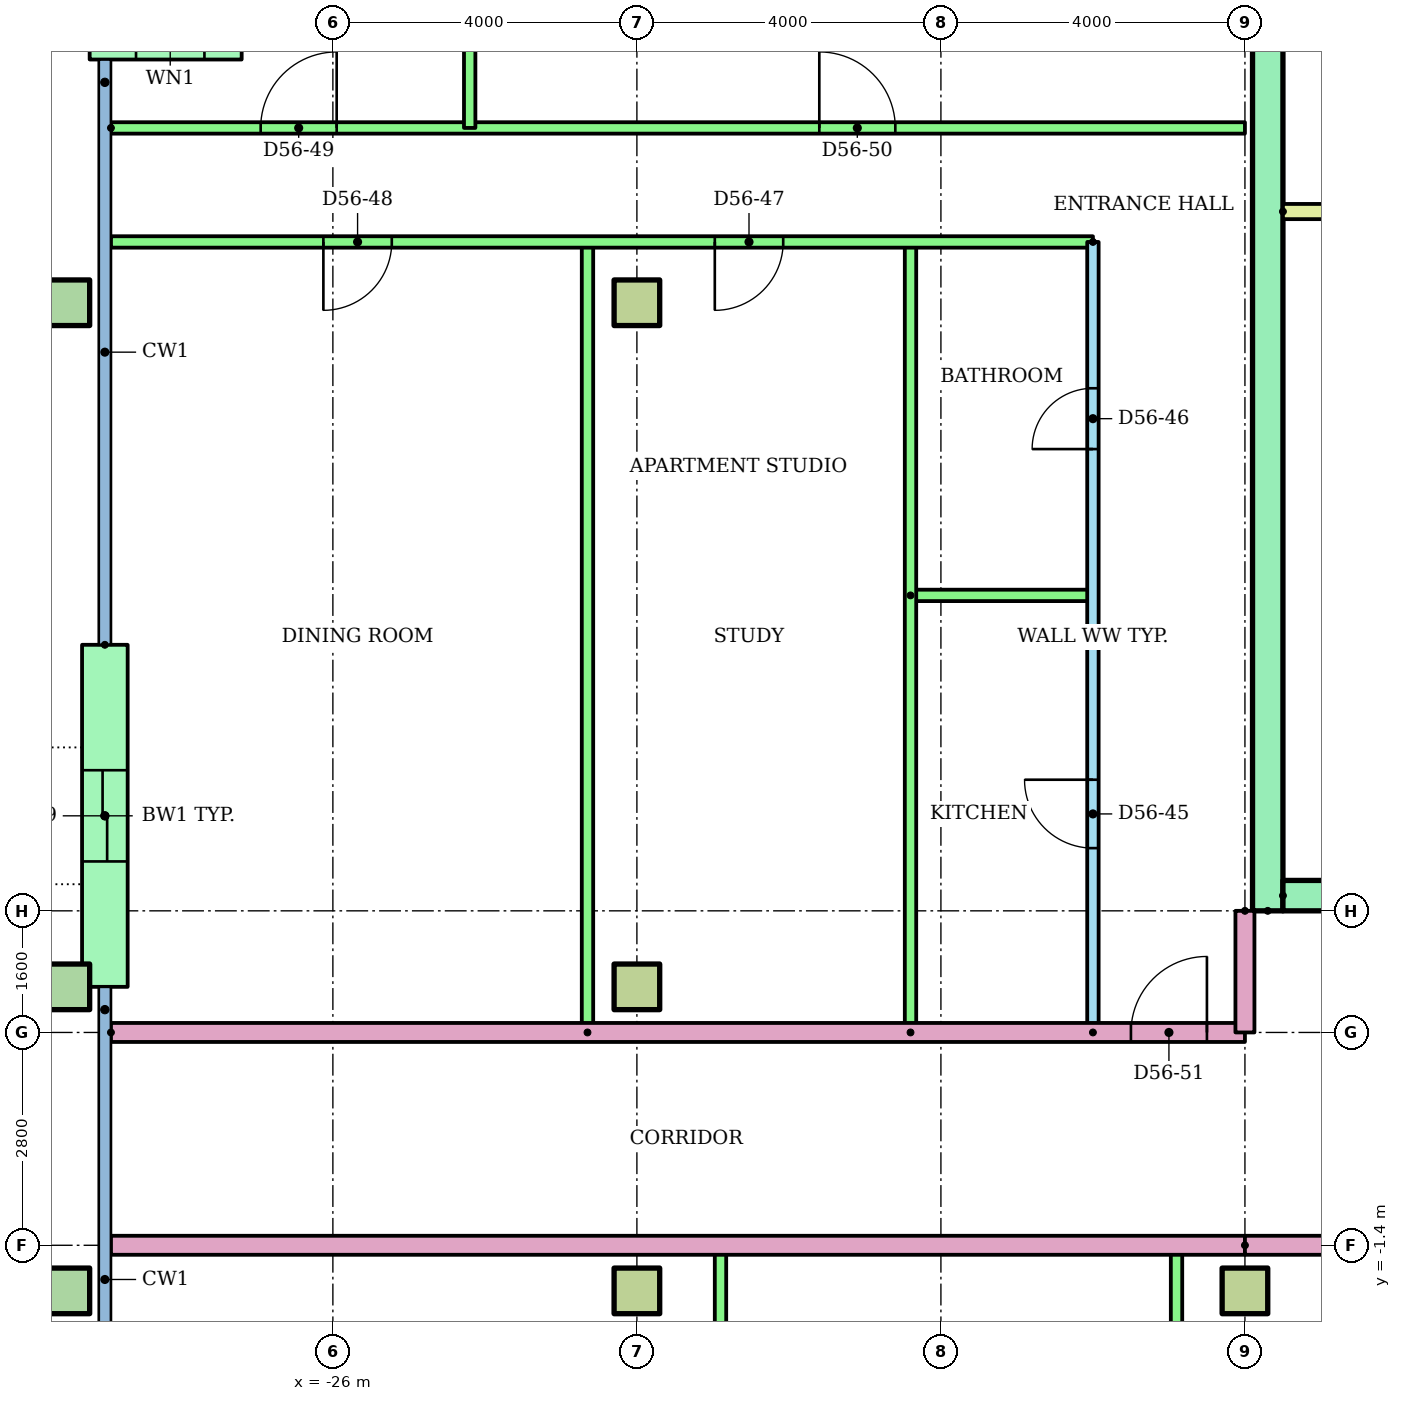
"""IFC4 building model, lengths in metres.
Left out: names, types, materials, properties, quantities, classifications, styles, units other than length and angle.
Written with IfcOpenShell. Run it as: python <this file> out.ifc"""

import sys

from ifc_helpers import new_model, si_unit, direction, frame, frame_2d, origin, origin_2d, place, context, subcontext, project, spatial, rectangle, hollow_rectangle, extrude, element, fill, save


model = new_model("IFC4")
c1 = context("Model", 3, precision=1e-05, world=origin(), true_north=direction((0.0, 1.0)))
c2 = subcontext(c1, "Body", "Model", "MODEL_VIEW")
j1 = project(units=[si_unit("LENGTHUNIT", "METRE"), si_unit("PLANEANGLEUNIT", "RADIAN")], contexts=[c1])
p1 = place(None, origin())
s1 = spatial("IfcSite", under=j1, at=p1, CompositionType="ELEMENT")
p2 = place(p1, origin())
s2 = spatial("IfcBuilding", under=s1, at=p2, CompositionType="ELEMENT")
p3 = place(p2, frame((0.0, 0.0, 217.2)))
s3 = spatial("IfcBuildingStorey", under=s2, at=p3, CompositionType="ELEMENT", Elevation=217.2)
p4 = place(p3, frame((-29.5, -2.0, 0.0)))
e1 = element("IfcColumn", 1, at=p4, inside=s3, PredefinedType="COLUMN", context=c2, shape_type="SweptSolid", body=[
    extrude(hollow_rectangle(XDim=0.6, YDim=0.6, WallThickness=0.03, at=origin_2d()), origin(), (0.0, 0.0, 1.0), 3.2),
])
for number, where in (
    (2, (-22.0, -2.0, 0.0)),
    (3, (-14.0, -2.0, 0.0)),
):
    element("IfcColumn", number, at=place(p3, frame(where)), inside=s3, PredefinedType="COLUMN", context=c2, shape_type="SweptSolid", body=[
        extrude(rectangle(XDim=0.6, YDim=0.6, at=origin_2d()), origin(), (0.0, 0.0, 1.0), 3.2),
    ])
p5 = place(p3, frame((-29.5, 2.0, 0.0)))
e4 = element("IfcColumn", 4, at=p5, inside=s3, PredefinedType="COLUMN", context=c2, shape_type="SweptSolid", body=[
    extrude(hollow_rectangle(XDim=0.6, YDim=0.6, WallThickness=0.03, at=origin_2d()), origin(), (0.0, 0.0, 1.0), 3.2),
])
p6 = place(p3, frame((-22.0, 2.0, 0.0)))
e5 = element("IfcColumn", 5, at=p6, inside=s3, PredefinedType="COLUMN", context=c2, shape_type="SweptSolid", body=[
    extrude(rectangle(XDim=0.6, YDim=0.6, at=origin_2d()), origin(), (0.0, 0.0, 1.0), 3.2),
])
p7 = place(p3, frame((-29.5, 11.0, 0.0)))
e6 = element("IfcColumn", 6, at=p7, inside=s3, PredefinedType="COLUMN", context=c2, shape_type="SweptSolid", body=[
    extrude(hollow_rectangle(XDim=0.6, YDim=0.6, WallThickness=0.03, at=origin_2d()), origin(), (0.0, 0.0, 1.0), 3.2),
])
p8 = place(p3, frame((-22.0, 11.0, 0.0)))
e7 = element("IfcColumn", 7, at=p8, inside=s3, PredefinedType="COLUMN", context=c2, shape_type="SweptSolid", body=[
    extrude(rectangle(XDim=0.6, YDim=0.6, at=origin_2d()), origin(), (0.0, 0.0, 1.0), 3.2),
])
p9 = place(p3, frame((-27.2, 14.5, 0.0), z_axis=(0.0, 0.0, 1.0), x_axis=(-1.0, 0.0, 0.0)))
e8 = element("IfcWall", 8, at=p9, inside=s3, PredefinedType="STANDARD", context=c2, shape_type="SweptSolid", body=[
    extrude(rectangle(XDim=2.0, YDim=0.6, at=frame_2d((1.0, 0.0))), origin(), (0.0, 0.0, 1.0), 2.92),
])
p10 = place(p9, frame((0.49, 0.0, 0.9)))
e9 = element("IfcOpeningElement", 9, at=p10, cuts=e8, PredefinedType="OPENING", context=c2, shape_type="SweptSolid", body=[
    extrude(rectangle(XDim=0.9, YDim=1.5, at=frame_2d((0.45, 0.75))), frame((0.0, 0.31, 0.0), z_axis=(0.0, -1.0, 0.0), x_axis=(1.0, 0.0, 0.0)), (0.0, 0.0, 1.0), 0.62),
])
p11 = place(p3, frame((-29.0, 6.5, 0.0), z_axis=(0.0, 0.0, 1.0), x_axis=(0.0, -1.0, 0.0)))
e10 = element("IfcWall", 10, at=p11, inside=s3, PredefinedType="STANDARD", context=c2, shape_type="SweptSolid", body=[
    extrude(rectangle(XDim=4.5, YDim=0.6, at=frame_2d((2.25, 0.0))), origin(), (0.0, 0.0, 1.0), 2.92),
])
p12 = place(p11, frame((1.65, 0.0, 0.0)))
e11 = element("IfcOpeningElement", 11, at=p12, cuts=e10, PredefinedType="OPENING", context=c2, shape_type="SweptSolid", body=[
    extrude(rectangle(XDim=1.2, YDim=2.1, at=frame_2d((0.6, 1.05))), frame((0.0, 0.31, 0.0), z_axis=(0.0, -1.0, 0.0), x_axis=(1.0, 0.0, 0.0)), (0.0, 0.0, 1.0), 0.62),
])
p13 = place(p3, frame((-13.7, 3.0, 0.0), z_axis=(0.0, 0.0, 1.0), x_axis=(0.0, 1.0, 0.0)))
e12 = element("IfcWall", 12, at=p13, inside=s3, PredefinedType="SHEAR", context=c2, shape_type="SweptSolid", body=[
    extrude(rectangle(XDim=17.0, YDim=0.4, at=frame_2d((8.5, 0.0))), origin(), (0.0, 0.0, 1.0), 2.92),
])
p14 = place(p3, frame((-13.5, 3.2, 0.0)))
e13 = element("IfcWall", 13, at=p14, inside=s3, PredefinedType="SHEAR", context=c2, shape_type="SweptSolid", body=[
    extrude(rectangle(XDim=27.0, YDim=0.4, at=frame_2d((13.5, 0.0))), origin(), (0.0, 0.0, 1.0), 2.92),
])
p15 = place(p14, frame((22.083, 0.0, 0.0)))
e14 = element("IfcOpeningElement", 14, at=p15, cuts=e13, PredefinedType="OPENING", context=c2, shape_type="SweptSolid", body=[
    extrude(rectangle(XDim=1.1, YDim=2.1, at=frame_2d((0.55, 1.05))), frame((0.0, 0.21, 0.0), z_axis=(0.0, -1.0, 0.0), x_axis=(1.0, 0.0, 0.0)), (0.0, 0.0, 1.0), 0.42),
])
p16 = place(p14, frame((25.128, 0.0, 0.0)))
e15 = element("IfcOpeningElement", 15, at=p16, cuts=e13, PredefinedType="OPENING", context=c2, shape_type="SweptSolid", body=[
    extrude(rectangle(XDim=1.1, YDim=2.1, at=frame_2d((0.55, 1.05))), frame((0.0, 0.21, 0.0), z_axis=(0.0, -1.0, 0.0), x_axis=(1.0, 0.0, 0.0)), (0.0, 0.0, 1.0), 0.42),
])
p17 = place(p14, frame((12.6, 0.0, 0.0)))
e16 = element("IfcOpeningElement", 16, at=p17, cuts=e13, PredefinedType="OPENING", context=c2, shape_type="SweptSolid", body=[
    extrude(rectangle(XDim=1.8, YDim=2.1, at=frame_2d((0.9, 1.05))), frame((0.0, 0.21, 0.0), z_axis=(0.0, -1.0, 0.0), x_axis=(1.0, 0.0, 0.0)), (0.0, 0.0, 1.0), 0.42),
])
p18 = place(p3, frame((-13.5, 12.2, 0.0)))
e17 = element("IfcWall", 17, at=p18, inside=s3, PredefinedType="PARTITIONING", context=c2, shape_type="SweptSolid", body=[
    extrude(rectangle(XDim=3.9, YDim=0.2, at=frame_2d((1.95, 0.0))), origin(), (0.0, 0.0, 1.0), 2.92),
])
for number, where, z_axis, x_axis in (
    (18, (-14.9, -9.4, 0.0), (0.0, 0.0, 1.0), (0.0, 1.0, 0.0)),
    (19, (-20.9, -9.4, 0.0), (0.0, 0.0, 1.0), (0.0, 1.0, 0.0)),
):
    element("IfcWall", number, at=place(p3, frame(where, z_axis=z_axis, x_axis=x_axis)), inside=s3, PredefinedType="PARTITIONING", context=c2, shape_type="SweptSolid", body=[
        extrude(rectangle(XDim=8.0, YDim=0.15, at=frame_2d((4.0, 0.0))), origin(), (0.0, 0.0, 1.0), 2.4),
    ])
p19 = place(p3, frame((-14.0, -1.4, 0.0), z_axis=(0.0, 0.0, 1.0), x_axis=(-1.0, 0.0, 0.0)))
e20 = element("IfcWall", 20, at=p19, inside=s3, PredefinedType="PARTITIONING", context=c2, shape_type="SweptSolid", body=[
    extrude(rectangle(XDim=14.92, YDim=0.25, at=frame_2d((7.46, 0.0))), origin(), (0.0, 0.0, 1.0), 2.4),
])
p20 = place(p3, frame((-16.0, 1.4, 0.0), z_axis=(0.0, 0.0, 1.0), x_axis=(0.0, 1.0, 0.0)))
e21 = element("IfcWall", 21, at=p20, inside=s3, PredefinedType="PARTITIONING", context=c2, shape_type="SweptSolid", body=[
    extrude(rectangle(XDim=10.4, YDim=0.15, at=frame_2d((5.2, 0.0))), origin(), (0.0, 0.0, 1.0), 2.4),
])
p21 = place(p20, frame((2.425, 0.0, 0.0)))
e22 = element("IfcOpeningElement", 22, at=p21, cuts=e21, PredefinedType="OPENING", context=c2, shape_type="SweptSolid", body=[
    extrude(rectangle(XDim=0.9, YDim=2.1, at=frame_2d((0.45, 1.05))), frame((0.0, 0.085, 0.0), z_axis=(0.0, -1.0, 0.0), x_axis=(1.0, 0.0, 0.0)), (0.0, 0.0, 1.0), 0.17),
])
p22 = place(p20, frame((7.675, 0.0, 0.0)))
e23 = element("IfcOpeningElement", 23, at=p22, cuts=e21, PredefinedType="OPENING", context=c2, shape_type="SweptSolid", body=[
    extrude(rectangle(XDim=0.8, YDim=2.1, at=frame_2d((0.4, 1.05))), frame((0.0, 0.085, 0.0), z_axis=(0.0, -1.0, 0.0), x_axis=(1.0, 0.0, 0.0)), (0.0, 0.0, 1.0), 0.17),
])
p23 = place(p3, frame((-18.4, 7.15, 0.0)))
e24 = element("IfcWall", 24, at=p23, inside=s3, PredefinedType="PARTITIONING", context=c2, shape_type="SweptSolid", body=[
    extrude(rectangle(XDim=2.4, YDim=0.15, at=frame_2d((1.2, 0.0))), origin(), (0.0, 0.0, 1.0), 2.4),
])
for number, where, z_axis, x_axis in (
    (25, (-18.4, 1.4, 0.0), (0.0, 0.0, 1.0), (0.0, 1.0, 0.0)),
    (26, (-22.65, 1.4, 0.0), (0.0, 0.0, 1.0), (0.0, 1.0, 0.0)),
):
    element("IfcWall", number, at=place(p3, frame(where, z_axis=z_axis, x_axis=x_axis)), inside=s3, PredefinedType="PARTITIONING", context=c2, shape_type="SweptSolid", body=[
        extrude(rectangle(XDim=10.4, YDim=0.15, at=frame_2d((5.2, 0.0))), origin(), (0.0, 0.0, 1.0), 2.4),
    ])
p24 = place(p3, frame((-16.0, 11.8, 0.0), z_axis=(0.0, 0.0, 1.0), x_axis=(-1.0, 0.0, 0.0)))
e27 = element("IfcWall", 27, at=p24, inside=s3, PredefinedType="PARTITIONING", context=c2, shape_type="SweptSolid", body=[
    extrude(rectangle(XDim=12.92, YDim=0.15, at=frame_2d((6.46, 0.0))), origin(), (0.0, 0.0, 1.0), 2.4),
])
p25 = place(p24, frame((4.075, 0.0, 0.0)))
e28 = element("IfcOpeningElement", 28, at=p25, cuts=e27, PredefinedType="OPENING", context=c2, shape_type="SweptSolid", body=[
    extrude(rectangle(XDim=0.9, YDim=2.1, at=frame_2d((0.45, 1.05))), frame((0.0, 0.085, 0.0), z_axis=(0.0, -1.0, 0.0), x_axis=(1.0, 0.0, 0.0)), (0.0, 0.0, 1.0), 0.17),
])
p26 = place(p24, frame((9.225, 0.0, 0.0)))
e29 = element("IfcOpeningElement", 29, at=p26, cuts=e27, PredefinedType="OPENING", context=c2, shape_type="SweptSolid", body=[
    extrude(rectangle(XDim=0.9, YDim=2.1, at=frame_2d((0.45, 1.05))), frame((0.0, 0.085, 0.0), z_axis=(0.0, -1.0, 0.0), x_axis=(1.0, 0.0, 0.0)), (0.0, 0.0, 1.0), 0.17),
])
p27 = place(p3, frame((-28.92, 13.3, 0.0)))
e30 = element("IfcWall", 30, at=p27, inside=s3, PredefinedType="PARTITIONING", context=c2, shape_type="SweptSolid", body=[
    extrude(rectangle(XDim=14.92, YDim=0.15, at=frame_2d((7.46, 0.0))), origin(), (0.0, 0.0, 1.0), 2.4),
])
p28 = place(p27, frame((1.97, 0.0, 0.0)))
e31 = element("IfcOpeningElement", 31, at=p28, cuts=e30, PredefinedType="OPENING", context=c2, shape_type="SweptSolid", body=[
    extrude(rectangle(XDim=1.0, YDim=2.1, at=frame_2d((0.5, 1.05))), frame((0.0, 0.085, 0.0), z_axis=(0.0, -1.0, 0.0), x_axis=(1.0, 0.0, 0.0)), (0.0, 0.0, 1.0), 0.17),
])
p29 = place(p27, frame((9.32, 0.0, 0.0)))
e32 = element("IfcOpeningElement", 32, at=p29, cuts=e30, PredefinedType="OPENING", context=c2, shape_type="SweptSolid", body=[
    extrude(rectangle(XDim=1.0, YDim=2.1, at=frame_2d((0.5, 1.05))), frame((0.0, 0.085, 0.0), z_axis=(0.0, -1.0, 0.0), x_axis=(1.0, 0.0, 0.0)), (0.0, 0.0, 1.0), 0.17),
])
p30 = place(p3, frame((-24.2, 17.12, 0.0), z_axis=(0.0, 0.0, 1.0), x_axis=(0.0, -1.0, 0.0)))
e33 = element("IfcWall", 33, at=p30, inside=s3, PredefinedType="PARTITIONING", context=c2, shape_type="SweptSolid", body=[
    extrude(rectangle(XDim=3.82, YDim=0.15, at=frame_2d((1.91, 0.0))), origin(), (0.0, 0.0, 1.0), 2.4),
])
p31 = place(p3, frame((-28.92, 1.4, 0.0)))
e34 = element("IfcWall", 34, at=p31, inside=s3, PredefinedType="PARTITIONING", context=c2, shape_type="SweptSolid", body=[
    extrude(rectangle(XDim=14.92, YDim=0.25, at=frame_2d((7.46, 0.0))), origin(), (0.0, 0.0, 1.0), 2.4),
])
p32 = place(p31, frame((13.42, 0.0, 0.0)))
e35 = element("IfcOpeningElement", 35, at=p32, cuts=e34, PredefinedType="OPENING", context=c2, shape_type="SweptSolid", body=[
    extrude(rectangle(XDim=1.0, YDim=2.1, at=frame_2d((0.5, 1.05))), frame((0.0, 0.135, 0.0), z_axis=(0.0, -1.0, 0.0), x_axis=(1.0, 0.0, 0.0)), (0.0, 0.0, 1.0), 0.27),
])
p33 = place(p3, frame((14.0, -1.4, 0.0), z_axis=(0.0, 0.0, 1.0), x_axis=(-1.0, 0.0, 0.0)))
e36 = element("IfcWall", 36, at=p33, inside=s3, PredefinedType="PARTITIONING", context=c2, shape_type="SweptSolid", body=[
    extrude(rectangle(XDim=28.0, YDim=0.25, at=frame_2d((14.0, 0.0))), origin(), (0.0, 0.0, 1.0), 2.4),
])
p34 = place(p33, frame((20.5, 0.0, 0.0)))
e37 = element("IfcOpeningElement", 37, at=p34, cuts=e36, PredefinedType="OPENING", context=c2, shape_type="SweptSolid", body=[
    extrude(rectangle(XDim=1.0, YDim=2.1, at=frame_2d((0.5, 1.05))), frame((0.0, 0.135, 0.0), z_axis=(0.0, -1.0, 0.0), x_axis=(1.0, 0.0, 0.0)), (0.0, 0.0, 1.0), 0.27),
])
p35 = place(p33, frame((12.5, 0.0, 0.0)))
e38 = element("IfcOpeningElement", 38, at=p35, cuts=e36, PredefinedType="OPENING", context=c2, shape_type="SweptSolid", body=[
    extrude(rectangle(XDim=1.0, YDim=2.1, at=frame_2d((0.5, 1.05))), frame((0.0, 0.135, 0.0), z_axis=(0.0, -1.0, 0.0), x_axis=(1.0, 0.0, 0.0)), (0.0, 0.0, 1.0), 0.27),
])
p36 = place(p33, frame((10.5, 0.0, 0.0)))
e39 = element("IfcOpeningElement", 39, at=p36, cuts=e36, PredefinedType="OPENING", context=c2, shape_type="SweptSolid", body=[
    extrude(rectangle(XDim=1.0, YDim=2.1, at=frame_2d((0.5, 1.05))), frame((0.0, 0.135, 0.0), z_axis=(0.0, -1.0, 0.0), x_axis=(1.0, 0.0, 0.0)), (0.0, 0.0, 1.0), 0.27),
])
p37 = place(p3, frame((-14.0, 3.0, 0.0), z_axis=(0.0, 0.0, 1.0), x_axis=(0.0, -1.0, 0.0)))
e40 = element("IfcWall", 40, at=p37, inside=s3, PredefinedType="PARTITIONING", context=c2, shape_type="SweptSolid", body=[
    extrude(rectangle(XDim=1.6, YDim=0.25, at=frame_2d((0.8, 0.0))), origin(), (0.0, 0.0, 1.0), 2.4),
])
p38 = place(p21, origin())
e41 = element("IfcDoor", 41, at=p38, inside=s3, OperationType="SINGLE_SWING_RIGHT", PredefinedType="DOOR", context=c2, shape_type="SweptSolid", body=[
    extrude(rectangle(XDim=0.9, YDim=2.1, at=frame_2d((0.45, 1.05))), frame((0.0, 0.025, 0.0), z_axis=(0.0, -1.0, 0.0), x_axis=(1.0, 0.0, 0.0)), (0.0, 0.0, 1.0), 0.05),
])
fill(e22, e41)
p39 = place(p22, origin())
e42 = element("IfcDoor", 42, at=p39, inside=s3, OperationType="SINGLE_SWING_LEFT", PredefinedType="DOOR", context=c2, shape_type="SweptSolid", body=[
    extrude(rectangle(XDim=0.8, YDim=2.1, at=frame_2d((0.4, 1.05))), frame((0.0, 0.025, 0.0), z_axis=(0.0, -1.0, 0.0), x_axis=(1.0, 0.0, 0.0)), (0.0, 0.0, 1.0), 0.05),
])
fill(e23, e42)
p40 = place(p25, origin())
e43 = element("IfcDoor", 43, at=p40, inside=s3, OperationType="SINGLE_SWING_RIGHT", PredefinedType="DOOR", context=c2, shape_type="SweptSolid", body=[
    extrude(rectangle(XDim=0.9, YDim=2.1, at=frame_2d((0.45, 1.05))), frame((0.0, 0.025, 0.0), z_axis=(0.0, -1.0, 0.0), x_axis=(1.0, 0.0, 0.0)), (0.0, 0.0, 1.0), 0.05),
])
fill(e28, e43)
p41 = place(p26, origin())
e44 = element("IfcDoor", 44, at=p41, inside=s3, OperationType="SINGLE_SWING_RIGHT", PredefinedType="DOOR", context=c2, shape_type="SweptSolid", body=[
    extrude(rectangle(XDim=0.9, YDim=2.1, at=frame_2d((0.45, 1.05))), frame((0.0, 0.025, 0.0), z_axis=(0.0, -1.0, 0.0), x_axis=(1.0, 0.0, 0.0)), (0.0, 0.0, 1.0), 0.05),
])
fill(e29, e44)
p42 = place(p28, origin())
e45 = element("IfcDoor", 45, at=p42, inside=s3, OperationType="SINGLE_SWING_RIGHT", PredefinedType="DOOR", context=c2, shape_type="SweptSolid", body=[
    extrude(rectangle(XDim=1.0, YDim=2.1, at=frame_2d((0.5, 1.05))), frame((0.0, 0.025, 0.0), z_axis=(0.0, -1.0, 0.0), x_axis=(1.0, 0.0, 0.0)), (0.0, 0.0, 1.0), 0.05),
])
fill(e31, e45)
p43 = place(p29, origin())
e46 = element("IfcDoor", 46, at=p43, inside=s3, OperationType="SINGLE_SWING_LEFT", PredefinedType="DOOR", context=c2, shape_type="SweptSolid", body=[
    extrude(rectangle(XDim=1.0, YDim=2.1, at=frame_2d((0.5, 1.05))), frame((0.0, 0.025, 0.0), z_axis=(0.0, -1.0, 0.0), x_axis=(1.0, 0.0, 0.0)), (0.0, 0.0, 1.0), 0.05),
])
fill(e32, e46)
p44 = place(p32, origin())
e47 = element("IfcDoor", 47, at=p44, inside=s3, OperationType="SINGLE_SWING_RIGHT", PredefinedType="DOOR", context=c2, shape_type="SweptSolid", body=[
    extrude(rectangle(XDim=1.0, YDim=2.1, at=frame_2d((0.5, 1.05))), frame((0.0, 0.025, 0.0), z_axis=(0.0, -1.0, 0.0), x_axis=(1.0, 0.0, 0.0)), (0.0, 0.0, 1.0), 0.05),
])
fill(e35, e47)
p45 = place(p12, origin())
e48 = element("IfcDoor", 48, at=p45, inside=s3, OperationType="SLIDING_TO_LEFT", PredefinedType="DOOR", context=c2, shape_type="SweptSolid", body=[
    extrude(rectangle(XDim=1.2, YDim=2.1, at=frame_2d((0.6, 1.05))), frame((0.0, 0.025, 0.0), z_axis=(0.0, -1.0, 0.0), x_axis=(1.0, 0.0, 0.0)), (0.0, 0.0, 1.0), 0.05),
])
fill(e11, e48)
save(model, sys.argv[1])
